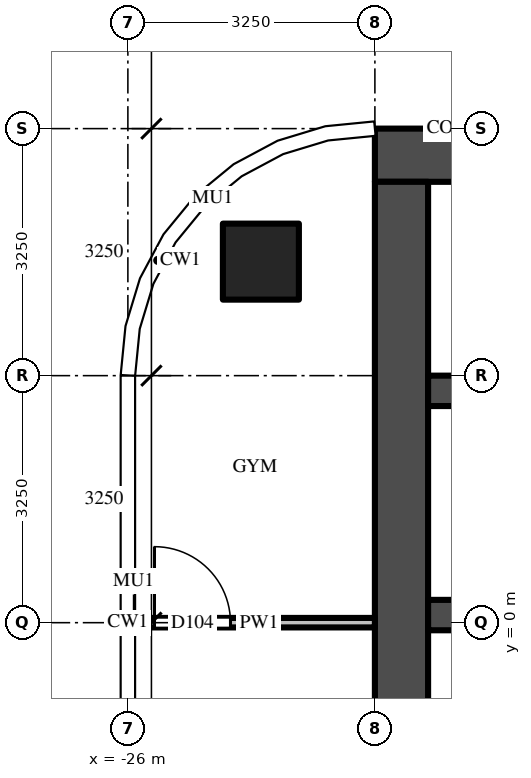
"""IFC4 building model, lengths in metres.
Left out: names, types, materials, properties, quantities, classifications, styles, units other than length and angle.
Written with IfcOpenShell. Run it as: python <this file> out.ifc"""

import sys

from ifc_helpers import new_model, si_unit, direction, frame, frame_2d, origin, origin_2d, place, context, subcontext, project, spatial, rectangle, extrude, source, transform, mapped, element, fill, save


model = new_model("IFC4")
c1 = context("Model", 3, precision=1e-05, world=origin(), true_north=direction((0.0, 1.0)))
c2 = subcontext(c1, "Body", "Model", "MODEL_VIEW")
j1 = project(units=[si_unit("LENGTHUNIT", "METRE"), si_unit("PLANEANGLEUNIT", "RADIAN")], contexts=[c1])
p1 = place(None, origin())
s1 = spatial("IfcSite", under=j1, at=p1, CompositionType="ELEMENT")
p2 = place(p1, origin())
s2 = spatial("IfcBuilding", under=s1, at=p2, CompositionType="ELEMENT")
p3 = place(p2, frame((0.0, 0.0, 291.1)))
s3 = spatial("IfcBuildingStorey", under=s2, at=p3, CompositionType="ELEMENT", Elevation=291.1)
m1 = source(origin(), c2, "Body", "SweptSolid", [
    extrude(rectangle(XDim=1.0, YDim=1.0, at=origin_2d()), origin(), (0.0, 0.0, 1.0), 3.9),
])
p4 = place(p3, frame((-24.25, 4.75, 0.0), z_axis=(0.0, 0.0, 1.0), x_axis=(1.0, 0.0, 0.0)))
e1 = element("IfcColumn", 1, at=p4, inside=s3, PredefinedType="COLUMN", context=c2, shape_type="MappedRepresentation", body=[
    mapped(m1, transform((0.0, 0.0, 0.0))),
])
m2 = source(origin(), c2, "Body", "SweptSolid", [
    extrude(rectangle(XDim=16.65, YDim=0.7, at=frame_2d((8.325, 0.0))), origin(), (0.0, 0.0, 1.0), 3.7),
])
p5 = place(p3, frame((-6.1, 6.15, 0.0), z_axis=(0.0, 0.0, 1.0), x_axis=(-1.0, 0.0, 0.0)))
e2 = element("IfcWall", 2, at=p5, inside=s3, PredefinedType="SHEAR", context=c2, shape_type="MappedRepresentation", body=[
    mapped(m2, transform((0.0, 0.0, 0.0))),
])
m3 = source(origin(), c2, "Body", "SweptSolid", [
    extrude(rectangle(XDim=9.05, YDim=0.7, at=frame_2d((4.525, 0.0))), origin(), (0.0, 0.0, 1.0), 3.7),
])
p6 = place(p3, frame((-22.4, 5.8, 0.0), z_axis=(0.0, 0.0, 1.0), x_axis=(0.0, -1.0, 0.0)))
e3 = element("IfcWall", 3, at=p6, inside=s3, PredefinedType="SHEAR", context=c2, shape_type="MappedRepresentation", body=[
    mapped(m3, transform((0.0, 0.0, 0.0))),
])
m4 = source(origin(), c2, "Body", "SweptSolid", [
    extrude(rectangle(XDim=14.85, YDim=0.4, at=frame_2d((7.425, 0.0))), origin(), (0.0, 0.0, 1.0), 3.7),
])
p7 = place(p3, frame((-7.2, 0.1, 0.0), z_axis=(0.0, 0.0, 1.0), x_axis=(-1.0, 0.0, 0.0)))
e4 = element("IfcWall", 4, at=p7, inside=s3, PredefinedType="SHEAR", context=c2, shape_type="MappedRepresentation", body=[
    mapped(m4, transform((0.0, 0.0, 0.0))),
])
m5 = source(origin(), c2, "Body", "SweptSolid", [
    extrude(rectangle(XDim=1.0, YDim=2.1, at=frame_2d((0.5, 1.05))), frame((0.0, 0.21, 0.0), z_axis=(0.0, -1.0, 0.0), x_axis=(1.0, 0.0, 0.0)), (0.0, 0.0, 1.0), 0.42),
])
p8 = place(p7, frame((7.9, 0.0, 0.0)))
e5 = element("IfcOpeningElement", 5, at=p8, cuts=e4, PredefinedType="OPENING", context=c2, shape_type="MappedRepresentation", body=[
    mapped(m5, transform((0.0, 0.0, 0.0))),
])
m6 = source(origin(), c2, "Body", "SweptSolid", [
    extrude(rectangle(XDim=5.7, YDim=0.4, at=frame_2d((2.85, 0.0))), origin(), (0.0, 0.0, 1.0), 3.7),
])
p9 = place(p3, frame((-16.35, 3.05, 0.0), z_axis=(0.0, 0.0, 1.0), x_axis=(-1.0, 0.0, 0.0)))
e6 = element("IfcWall", 6, at=p9, inside=s3, PredefinedType="SHEAR", context=c2, shape_type="MappedRepresentation", body=[
    mapped(m6, transform((0.0, 0.0, 0.0))),
])
m7 = source(origin(), c2, "Body", "SweptSolid", [
    extrude(rectangle(XDim=3.05, YDim=0.125, at=frame_2d((1.525, 0.0))), origin(), (0.0, 0.0, 1.0), 2.78),
])
p10 = place(p3, frame((-25.8, 0.0, 0.0), z_axis=(0.0, 0.0, 1.0), x_axis=(1.0, 0.0, 0.0)))
e7 = element("IfcWall", 7, at=p10, inside=s3, PredefinedType="PARTITIONING", context=c2, shape_type="MappedRepresentation", body=[
    mapped(m7, transform((0.0, 0.0, 0.0))),
])
m8 = source(origin(), c2, "Body", "SweptSolid", [
    extrude(rectangle(XDim=1.0, YDim=2.1, at=frame_2d((0.5, 1.05))), frame((0.0, 0.073, 0.0), z_axis=(0.0, -1.0, 0.0), x_axis=(1.0, 0.0, 0.0)), (0.0, 0.0, 1.0), 0.145),
])
p11 = place(p10, frame((0.15, 0.0, 0.0)))
e8 = element("IfcOpeningElement", 8, at=p11, cuts=e7, PredefinedType="OPENING", context=c2, shape_type="MappedRepresentation", body=[
    mapped(m8, transform((0.0, 0.0, 0.0))),
])
m9 = source(origin(), c2, "Body", "SweptSolid", [
    extrude(rectangle(XDim=1.0, YDim=2.1, at=frame_2d((0.5, 1.05))), frame((0.0, 0.025, 0.0), z_axis=(0.0, -1.0, 0.0), x_axis=(1.0, 0.0, 0.0)), (0.0, 0.0, 1.0), 0.05),
])
p12 = place(p11, origin())
e9 = element("IfcDoor", 9, at=p12, inside=s3, OperationType="SINGLE_SWING_LEFT", PredefinedType="DOOR", context=c2, shape_type="MappedRepresentation", body=[
    mapped(m9, transform((0.0, 0.0, 0.0))),
])
fill(e8, e9)
save(model, sys.argv[1])
